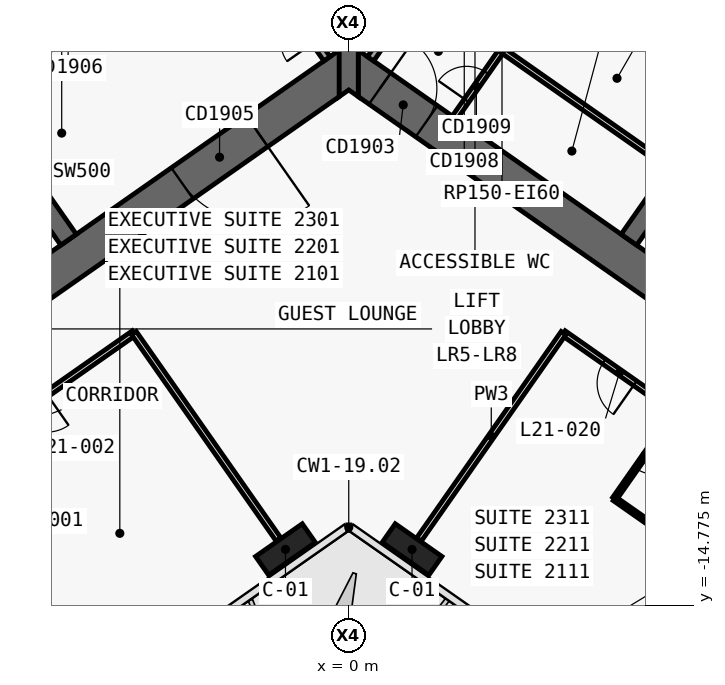
"""IFC4 building model, lengths in metres.
Left out: names, types, materials, properties, quantities, classifications, styles, units other than length and angle.
Written with IfcOpenShell. Run it as: python <this file> out.ifc"""

import sys

from ifc_helpers import new_model, si_unit, direction, frame, frame_2d, origin, origin_2d, place, context, subcontext, project, spatial, polyline, rectangle, outline, extrude, element, fill, save


model = new_model("IFC4")
c1 = context("Model", 3, precision=1e-05, world=origin(), true_north=direction((0.0, 1.0)))
c2 = subcontext(c1, "Body", "Model", "MODEL_VIEW")
j1 = project(units=[si_unit("LENGTHUNIT", "METRE"), si_unit("PLANEANGLEUNIT", "RADIAN")], contexts=[c1])
p1 = place(None, origin())
s1 = spatial("IfcSite", under=j1, at=p1, CompositionType="ELEMENT")
p2 = place(p1, origin())
s2 = spatial("IfcBuilding", under=s1, at=p2, CompositionType="ELEMENT")
p3 = place(p2, frame((0.0, 0.0, 101.3)))
s3 = spatial("IfcBuildingStorey", under=s2, at=p3, CompositionType="ELEMENT", Elevation=101.3)
p4 = place(p3, frame((0.037, 11.867, 0.0), z_axis=(0.0, 0.0, 1.0), x_axis=(-0.819155306259, -0.573571777746, 0.0)))
e1 = element("IfcWall", 1, at=p4, inside=s3, PredefinedType="SHEAR", context=c2, shape_type="SweptSolid", body=[
    extrude(outline(polyline([(33.837, 0.5), (0.7, 0.5), (0.0, -0.5), (33.837, -0.5), (33.837, 0.5)])), origin(), (0.0, 0.0, 1.0), 3.6),
])
p5 = place(p3, frame((0.037, -0.585, 0.0), z_axis=(0.0, 0.0, 1.0), x_axis=(-0.819157152511, -0.573569140985, 0.0)))
e2 = element("IfcWall", 2, at=p5, inside=s3, PredefinedType="SHEAR", context=c2, shape_type="SweptSolid", body=[
    extrude(outline(polyline([(26.695, 0.5), (0.7, 0.5), (0.0, -0.5), (26.695, -0.5), (26.695, 0.5)])), origin(), (0.0, 0.0, 1.0), 3.6),
])
p6 = place(p5, frame((2.995, 0.0, 0.0)))
e3 = element("IfcOpeningElement", 3, at=p6, cuts=e2, PredefinedType="OPENING", context=c2, shape_type="SweptSolid", body=[
    extrude(rectangle(XDim=2.4, YDim=2.1, at=frame_2d((1.2, 1.05))), frame((0.0, 0.51, 0.0), z_axis=(0.0, -1.0, 0.0), x_axis=(1.0, 0.0, 0.0)), (0.0, 0.0, 1.0), 1.02),
])
p7 = place(p5, frame((11.995, 0.0, 0.0)))
e4 = element("IfcOpeningElement", 4, at=p7, cuts=e2, PredefinedType="OPENING", context=c2, shape_type="SweptSolid", body=[
    extrude(rectangle(XDim=2.4, YDim=2.1, at=frame_2d((1.2, 1.05))), frame((0.0, 0.51, 0.0), z_axis=(0.0, -1.0, 0.0), x_axis=(1.0, 0.0, 0.0)), (0.0, 0.0, 1.0), 1.02),
])
p8 = place(p3, frame((-7.372, -5.162, 0.0), z_axis=(0.0, 0.0, 1.0), x_axis=(-0.573594173421, 0.819139624372, 0.0)))
e5 = element("IfcWall", 5, at=p8, inside=s3, PredefinedType="SHEAR", context=c2, shape_type="SweptSolid", body=[
    extrude(outline(polyline([(4.35, 0.25), (0.0, 0.25), (0.0, -0.25), (4.35, -0.25), (4.35, 0.25)])), origin(), (0.0, 0.0, 1.0), 3.6),
])
p9 = place(p3, frame((-2.638, 3.768, 0.0), z_axis=(0.0, 0.0, 1.0), x_axis=(-0.819148977158, -0.573580816643, 0.0)))
e6 = element("IfcWall", 6, at=p9, inside=s3, PredefinedType="SHEAR", context=c2, shape_type="SweptSolid", body=[
    extrude(outline(polyline([(26.0, 0.25), (0.0, 0.25), (0.0, -0.25), (26.0, -0.25), (26.0, 0.25)])), origin(), (0.0, 0.0, 1.0), 3.6),
])
p10 = place(p9, frame((1.169, 0.0, 0.0)))
e7 = element("IfcOpeningElement", 7, at=p10, cuts=e6, PredefinedType="OPENING", context=c2, shape_type="SweptSolid", body=[
    extrude(rectangle(XDim=1.1, YDim=2.1, at=frame_2d((0.55, 1.05))), frame((0.0, 0.26, 0.0), z_axis=(0.0, -1.0, 0.0), x_axis=(1.0, 0.0, 0.0)), (0.0, 0.0, 1.0), 0.52),
])
p11 = place(p9, frame((3.206, 0.0, 0.0)))
e8 = element("IfcOpeningElement", 8, at=p11, cuts=e6, PredefinedType="OPENING", context=c2, shape_type="SweptSolid", body=[
    extrude(rectangle(XDim=1.1, YDim=2.1, at=frame_2d((0.55, 1.05))), frame((0.0, 0.26, 0.0), z_axis=(0.0, -1.0, 0.0), x_axis=(1.0, 0.0, 0.0)), (0.0, 0.0, 1.0), 0.52),
])
p12 = place(p9, frame((5.244, 0.0, 0.0)))
e9 = element("IfcOpeningElement", 9, at=p12, cuts=e6, PredefinedType="OPENING", context=c2, shape_type="SweptSolid", body=[
    extrude(rectangle(XDim=1.1, YDim=2.1, at=frame_2d((0.55, 1.05))), frame((0.0, 0.26, 0.0), z_axis=(0.0, -1.0, 0.0), x_axis=(1.0, 0.0, 0.0)), (0.0, 0.0, 1.0), 0.52),
])
p13 = place(p9, frame((7.281, 0.0, 0.0)))
e10 = element("IfcOpeningElement", 10, at=p13, cuts=e6, PredefinedType="OPENING", context=c2, shape_type="SweptSolid", body=[
    extrude(rectangle(XDim=1.1, YDim=2.1, at=frame_2d((0.55, 1.05))), frame((0.0, 0.26, 0.0), z_axis=(0.0, -1.0, 0.0), x_axis=(1.0, 0.0, 0.0)), (0.0, 0.0, 1.0), 0.52),
])
p14 = place(p9, frame((9.688, 0.0, 0.0)))
e11 = element("IfcOpeningElement", 11, at=p14, cuts=e6, PredefinedType="OPENING", context=c2, shape_type="SweptSolid", body=[
    extrude(rectangle(XDim=1.1, YDim=2.1, at=frame_2d((0.55, 1.05))), frame((0.0, 0.26, 0.0), z_axis=(0.0, -1.0, 0.0), x_axis=(1.0, 0.0, 0.0)), (0.0, 0.0, 1.0), 0.52),
])
p15 = place(p9, frame((11.863, 0.0, 0.0)))
e12 = element("IfcOpeningElement", 12, at=p15, cuts=e6, PredefinedType="OPENING", context=c2, shape_type="SweptSolid", body=[
    extrude(rectangle(XDim=1.1, YDim=2.1, at=frame_2d((0.55, 1.05))), frame((0.0, 0.26, 0.0), z_axis=(0.0, -1.0, 0.0), x_axis=(1.0, 0.0, 0.0)), (0.0, 0.0, 1.0), 0.52),
])
p16 = place(p9, frame((14.038, 0.0, 0.0)))
e13 = element("IfcOpeningElement", 13, at=p16, cuts=e6, PredefinedType="OPENING", context=c2, shape_type="SweptSolid", body=[
    extrude(rectangle(XDim=1.1, YDim=2.1, at=frame_2d((0.55, 1.05))), frame((0.0, 0.26, 0.0), z_axis=(0.0, -1.0, 0.0), x_axis=(1.0, 0.0, 0.0)), (0.0, 0.0, 1.0), 0.52),
])
p17 = place(p9, frame((16.212, 0.0, 0.0)))
e14 = element("IfcOpeningElement", 14, at=p17, cuts=e6, PredefinedType="OPENING", context=c2, shape_type="SweptSolid", body=[
    extrude(rectangle(XDim=1.1, YDim=2.1, at=frame_2d((0.55, 1.05))), frame((0.0, 0.26, 0.0), z_axis=(0.0, -1.0, 0.0), x_axis=(1.0, 0.0, 0.0)), (0.0, 0.0, 1.0), 0.52),
])
p18 = place(p3, frame((-0.037, 11.867, 0.0), z_axis=(0.0, 0.0, 1.0), x_axis=(0.819155306259, -0.573571777746, 0.0)))
e15 = element("IfcWall", 15, at=p18, inside=s3, PredefinedType="SHEAR", context=c2, shape_type="SweptSolid", body=[
    extrude(outline(polyline([(33.837, 0.5), (0.0, 0.5), (0.7, -0.5), (33.837, -0.5), (33.837, 0.5)])), origin(), (0.0, 0.0, 1.0), 3.6),
])
p19 = place(p3, frame((-0.037, -0.585, 0.0), z_axis=(0.0, 0.0, 1.0), x_axis=(0.819157152511, -0.573569140985, 0.0)))
e16 = element("IfcWall", 16, at=p19, inside=s3, PredefinedType="SHEAR", context=c2, shape_type="SweptSolid", body=[
    extrude(outline(polyline([(26.695, 0.5), (0.0, 0.5), (0.7, -0.5), (26.695, -0.5), (26.695, 0.5)])), origin(), (0.0, 0.0, 1.0), 3.6),
])
p20 = place(p19, frame((1.045, 0.0, 0.0)))
e17 = element("IfcOpeningElement", 17, at=p20, cuts=e16, PredefinedType="OPENING", context=c2, shape_type="SweptSolid", body=[
    extrude(rectangle(XDim=1.5, YDim=2.1, at=frame_2d((0.75, 1.05))), frame((0.0, 0.51, 0.0), z_axis=(0.0, -1.0, 0.0), x_axis=(1.0, 0.0, 0.0)), (0.0, 0.0, 1.0), 1.02),
])
p21 = place(p19, frame((12.445, 0.0, 0.0)))
e18 = element("IfcOpeningElement", 18, at=p21, cuts=e16, PredefinedType="OPENING", context=c2, shape_type="SweptSolid", body=[
    extrude(rectangle(XDim=1.5, YDim=2.1, at=frame_2d((0.75, 1.05))), frame((0.0, 0.51, 0.0), z_axis=(0.0, -1.0, 0.0), x_axis=(1.0, 0.0, 0.0)), (0.0, 0.0, 1.0), 1.02),
])
p22 = place(p3, frame((7.372, -5.162, 0.0), z_axis=(0.0, 0.0, 1.0), x_axis=(0.573594173421, 0.819139624372, 0.0)))
e19 = element("IfcWall", 19, at=p22, inside=s3, PredefinedType="SHEAR", context=c2, shape_type="SweptSolid", body=[
    extrude(outline(polyline([(0.0, 0.25), (0.0, -0.25), (4.35, -0.25), (4.35, 0.25), (0.0, 0.25)])), origin(), (0.0, 0.0, 1.0), 3.6),
])
p23 = place(p3, frame((2.638, 3.768, 0.0), z_axis=(0.0, 0.0, 1.0), x_axis=(0.819148977158, -0.573580816643, 0.0)))
e20 = element("IfcWall", 20, at=p23, inside=s3, PredefinedType="SHEAR", context=c2, shape_type="SweptSolid", body=[
    extrude(outline(polyline([(0.0, 0.25), (0.0, -0.25), (26.0, -0.25), (26.0, 0.25), (0.0, 0.25)])), origin(), (0.0, 0.0, 1.0), 3.6),
])
p24 = place(p23, frame((9.637, 0.0, 0.0)))
e21 = element("IfcOpeningElement", 21, at=p24, cuts=e20, PredefinedType="OPENING", context=c2, shape_type="SweptSolid", body=[
    extrude(rectangle(XDim=1.2, YDim=2.1, at=frame_2d((0.6, 1.05))), frame((0.0, 0.26, 0.0), z_axis=(0.0, -1.0, 0.0), x_axis=(1.0, 0.0, 0.0)), (0.0, 0.0, 1.0), 0.52),
])
p25 = place(p23, frame((11.812, 0.0, 0.0)))
e22 = element("IfcOpeningElement", 22, at=p25, cuts=e20, PredefinedType="OPENING", context=c2, shape_type="SweptSolid", body=[
    extrude(rectangle(XDim=1.2, YDim=2.1, at=frame_2d((0.6, 1.05))), frame((0.0, 0.26, 0.0), z_axis=(0.0, -1.0, 0.0), x_axis=(1.0, 0.0, 0.0)), (0.0, 0.0, 1.0), 0.52),
])
p26 = place(p23, frame((13.988, 0.0, 0.0)))
e23 = element("IfcOpeningElement", 23, at=p26, cuts=e20, PredefinedType="OPENING", context=c2, shape_type="SweptSolid", body=[
    extrude(rectangle(XDim=1.2, YDim=2.1, at=frame_2d((0.6, 1.05))), frame((0.0, 0.26, 0.0), z_axis=(0.0, -1.0, 0.0), x_axis=(1.0, 0.0, 0.0)), (0.0, 0.0, 1.0), 0.52),
])
p27 = place(p23, frame((16.262, 0.0, 0.0)))
e24 = element("IfcOpeningElement", 24, at=p27, cuts=e20, PredefinedType="OPENING", context=c2, shape_type="SweptSolid", body=[
    extrude(rectangle(XDim=1.0, YDim=2.1, at=frame_2d((0.5, 1.05))), frame((0.0, 0.26, 0.0), z_axis=(0.0, -1.0, 0.0), x_axis=(1.0, 0.0, 0.0)), (0.0, 0.0, 1.0), 0.52),
])
p28 = place(p3, frame((0.0, -1.396, 0.0), z_axis=(0.0, 0.0, 1.0), x_axis=(0.0, 1.0, 0.0)))
e25 = element("IfcWall", 25, at=p28, inside=s3, PredefinedType="SHEAR", context=c2, shape_type="SweptSolid", body=[
    extrude(outline(polyline([(0.0, -0.25), (0.175, -0.25), (1.221, -0.25), (12.452, -0.25), (13.848, -0.25), (13.857, -0.25), (13.968, -0.172), (13.848, 0.0), (13.968, 0.172), (13.857, 0.25), (13.848, 0.25), (12.452, 0.25), (1.221, 0.25), (0.175, 0.25), (0.0, 0.25), (0.175, 0.0), (0.0, -0.25)])), origin(), (0.0, 0.0, 1.0), 3.6),
])
for number, where, z_axis, x_axis in (
    (26, (-1.665, -13.313, 0.0), (0.0, 0.0, 1.0), (-0.819, -0.574, 0.0)),
    (27, (1.665, -13.313, 0.0), (0.0, 0.0, 1.0), (0.819, -0.574, 0.0)),
):
    element("IfcColumn", number, at=place(p3, frame(where, z_axis=z_axis, x_axis=x_axis)), inside=s3, PredefinedType="COLUMN", context=c2, shape_type="SweptSolid", body=[
        extrude(rectangle(XDim=1.5, YDim=0.6, at=origin_2d()), origin(), (0.0, 0.0, 1.0), 3.6),
    ])
p29 = place(p3, frame((2.785, -1.95, 0.0), z_axis=(0.0, 0.0, 1.0), x_axis=(0.57356780395, 0.819158088694, 0.0)))
e28 = element("IfcWall", 28, at=p29, inside=s3, PredefinedType="PARTITIONING", context=c2, shape_type="SweptSolid", body=[
    extrude(rectangle(XDim=4.35, YDim=0.15, at=frame_2d((2.175, 0.0))), origin(), (0.0, 0.0, 1.0), 3.32),
])
p30 = place(p29, frame((0.55, 0.0, 0.0)))
e29 = element("IfcOpeningElement", 29, at=p30, cuts=e28, PredefinedType="OPENING", context=c2, shape_type="SweptSolid", body=[
    extrude(rectangle(XDim=0.9, YDim=2.1, at=frame_2d((0.45, 1.05))), frame((0.0, 0.085, 0.0), z_axis=(0.0, -1.0, 0.0), x_axis=(1.0, 0.0, 0.0)), (0.0, 0.0, 1.0), 0.17),
])
p31 = place(p29, frame((2.825, 0.0, 0.0)))
e30 = element("IfcOpeningElement", 30, at=p31, cuts=e28, PredefinedType="OPENING", context=c2, shape_type="SweptSolid", body=[
    extrude(rectangle(XDim=0.9, YDim=2.1, at=frame_2d((0.45, 1.05))), frame((0.0, 0.085, 0.0), z_axis=(0.0, -1.0, 0.0), x_axis=(1.0, 0.0, 0.0)), (0.0, 0.0, 1.0), 0.17),
])
p32 = place(p3, frame((4.033, -0.168, 0.0), z_axis=(0.0, 0.0, 1.0), x_axis=(0.819146154531, -0.573584847705, 0.0)))
e31 = element("IfcWall", 31, at=p32, inside=s3, PredefinedType="PARTITIONING", context=c2, shape_type="SweptSolid", body=[
    extrude(rectangle(XDim=5.35, YDim=0.15, at=frame_2d((2.675, 0.0))), origin(), (0.0, 0.0, 1.0), 3.32),
])
p33 = place(p3, frame((-0.573, -0.402, 0.0), z_axis=(0.0, 0.0, 1.0), x_axis=(-0.57356780395, 0.819158088694, 0.0)))
e32 = element("IfcWall", 32, at=p33, inside=s3, PredefinedType="SOLIDWALL", context=c2, shape_type="SweptSolid", body=[
    extrude(rectangle(XDim=4.35, YDim=0.2, at=frame_2d((2.175, 0.0))), origin(), (0.0, 0.0, 1.0), 3.32),
])
p34 = place(p33, frame((0.55, 0.0, 0.0)))
e33 = element("IfcOpeningElement", 33, at=p34, cuts=e32, PredefinedType="OPENING", context=c2, shape_type="SweptSolid", body=[
    extrude(rectangle(XDim=0.9, YDim=2.1, at=frame_2d((0.45, 1.05))), frame((0.0, 0.11, 0.0), z_axis=(0.0, -1.0, 0.0), x_axis=(1.0, 0.0, 0.0)), (0.0, 0.0, 1.0), 0.22),
])
p35 = place(p3, frame((0.573, -0.402, 0.0), z_axis=(0.0, 0.0, 1.0), x_axis=(0.57356780395, 0.819158088694, 0.0)))
e34 = element("IfcWall", 34, at=p35, inside=s3, PredefinedType="SOLIDWALL", context=c2, shape_type="SweptSolid", body=[
    extrude(rectangle(XDim=4.35, YDim=0.2, at=frame_2d((2.175, 0.0))), origin(), (0.0, 0.0, 1.0), 3.32),
])
p36 = place(p35, frame((0.55, 0.0, 0.0)))
e35 = element("IfcOpeningElement", 35, at=p36, cuts=e34, PredefinedType="OPENING", context=c2, shape_type="SweptSolid", body=[
    extrude(rectangle(XDim=0.9, YDim=2.1, at=frame_2d((0.45, 1.05))), frame((0.0, 0.11, 0.0), z_axis=(0.0, -1.0, 0.0), x_axis=(1.0, 0.0, 0.0)), (0.0, 0.0, 1.0), 0.22),
])
p37 = place(p3, frame((8.601, -9.685, 0.0), z_axis=(0.0, 0.0, 1.0), x_axis=(-0.819149096931, 0.573580645591, 0.0)))
e36 = element("IfcWall", 36, at=p37, inside=s3, PredefinedType="PARTITIONING", context=c2, shape_type="SweptSolid", body=[
    extrude(rectangle(XDim=3.601, YDim=0.15, at=frame_2d((1.8, 0.0))), origin(), (0.0, 0.0, 1.0), 2.6),
])
p38 = place(p37, frame((1.301, 0.0, 0.0)))
e37 = element("IfcOpeningElement", 37, at=p38, cuts=e36, PredefinedType="OPENING", context=c2, shape_type="SweptSolid", body=[
    extrude(rectangle(XDim=1.0, YDim=2.1, at=frame_2d((0.5, 1.05))), frame((0.0, 0.085, 0.0), z_axis=(0.0, -1.0, 0.0), x_axis=(1.0, 0.0, 0.0)), (0.0, 0.0, 1.0), 0.17),
])
p39 = place(p3, frame((-5.652, -7.62, 0.0), z_axis=(0.0, 0.0, 1.0), x_axis=(-0.819155459934, -0.573571558274, 0.0)))
e38 = element("IfcWall", 38, at=p39, inside=s3, PredefinedType="PARTITIONING", context=c2, shape_type="SweptSolid", body=[
    extrude(rectangle(XDim=6.601, YDim=0.15, at=frame_2d((3.301, 0.0))), origin(), (0.0, 0.0, 1.0), 2.6),
])
p40 = place(p39, frame((2.8, 0.0, 0.0)))
e39 = element("IfcOpeningElement", 39, at=p40, cuts=e38, PredefinedType="OPENING", context=c2, shape_type="SweptSolid", body=[
    extrude(rectangle(XDim=1.0, YDim=2.1, at=frame_2d((0.5, 1.05))), frame((0.0, 0.085, 0.0), z_axis=(0.0, -1.0, 0.0), x_axis=(1.0, 0.0, 0.0)), (0.0, 0.0, 1.0), 0.17),
])
p41 = place(p3, frame((8.6, -9.684, 0.0), z_axis=(0.0, 0.0, 1.0), x_axis=(-0.573550118428, -0.819170471667, 0.0)))
e40 = element("IfcWall", 40, at=p41, inside=s3, PredefinedType="PARTITIONING", context=c2, shape_type="SweptSolid", body=[
    extrude(rectangle(XDim=2.8, YDim=0.12, at=frame_2d((1.4, 0.0))), origin(), (0.0, 0.0, 1.0), 3.32),
])
p42 = place(p41, frame((0.975, 0.0, 0.0)))
e41 = element("IfcOpeningElement", 41, at=p42, cuts=e40, PredefinedType="OPENING", context=c2, shape_type="SweptSolid", body=[
    extrude(rectangle(XDim=0.85, YDim=2.05, at=frame_2d((0.425, 1.025))), frame((0.0, 0.07, 0.0), z_axis=(0.0, -1.0, 0.0), x_axis=(1.0, 0.0, 0.0)), (0.0, 0.0, 1.0), 0.14),
])
p43 = place(p3, frame((6.994, -11.979, 0.0), z_axis=(0.0, 0.0, 1.0), x_axis=(0.819188907105, -0.573523787192, 0.0)))
e42 = element("IfcWall", 42, at=p43, inside=s3, PredefinedType="PARTITIONING", context=c2, shape_type="SweptSolid", body=[
    extrude(rectangle(XDim=2.4, YDim=0.12, at=frame_2d((1.2, 0.0))), origin(), (0.0, 0.0, 1.0), 3.32),
])
p44 = place(p3, frame((8.96, -13.355, 0.0), z_axis=(0.0, 0.0, 1.0), x_axis=(-0.573564311442, -0.819160534108, 0.0)))
e43 = element("IfcWall", 43, at=p44, inside=s3, PredefinedType="PARTITIONING", context=c2, shape_type="SweptSolid", body=[
    extrude(rectangle(XDim=4.499, YDim=0.15, at=frame_2d((2.25, 0.0))), origin(), (0.0, 0.0, 1.0), 2.5),
])
p45 = place(p3, frame((1.849, -13.051, 0.0), z_axis=(0.0, 0.0, 1.0), x_axis=(0.57357355307, 0.819154063177, 0.0)))
e44 = element("IfcWall", 44, at=p45, inside=s3, PredefinedType="PARTITIONING", context=c2, shape_type="SweptSolid", body=[
    extrude(rectangle(XDim=6.63, YDim=0.15, at=frame_2d((3.315, 0.0))), origin(), (0.0, 0.0, 1.0), 2.6),
])
p46 = place(p3, frame((-1.849, -13.051, 0.0), z_axis=(0.0, 0.0, 1.0), x_axis=(-0.573575988258, 0.819152358047, 0.0)))
e45 = element("IfcWall", 45, at=p46, inside=s3, PredefinedType="PARTITIONING", context=c2, shape_type="SweptSolid", body=[
    extrude(rectangle(XDim=6.632, YDim=0.15, at=frame_2d((3.316, 0.0))), origin(), (0.0, 0.0, 1.0), 2.6),
])
p47 = place(p6, origin())
e46 = element("IfcDoor", 46, at=p47, inside=s3, OperationType="DOUBLE_DOOR_SINGLE_SWING", PredefinedType="DOOR", context=c2, shape_type="SweptSolid", body=[
    extrude(rectangle(XDim=2.4, YDim=2.1, at=frame_2d((1.2, 1.05))), frame((0.0, 0.025, 0.0), z_axis=(0.0, -1.0, 0.0), x_axis=(1.0, 0.0, 0.0)), (0.0, 0.0, 1.0), 0.05),
])
fill(e3, e46)
p48 = place(p30, origin())
e47 = element("IfcDoor", 47, at=p48, inside=s3, OperationType="SINGLE_SWING_RIGHT", PredefinedType="DOOR", context=c2, shape_type="SweptSolid", body=[
    extrude(rectangle(XDim=0.9, YDim=2.1, at=frame_2d((0.45, 1.05))), frame((0.0, 0.025, 0.0), z_axis=(0.0, -1.0, 0.0), x_axis=(1.0, 0.0, 0.0)), (0.0, 0.0, 1.0), 0.05),
])
fill(e29, e47)
p49 = place(p20, origin())
e48 = element("IfcDoor", 48, at=p49, inside=s3, OperationType="SINGLE_SWING_RIGHT", PredefinedType="DOOR", context=c2, shape_type="SweptSolid", body=[
    extrude(rectangle(XDim=1.5, YDim=2.1, at=frame_2d((0.75, 1.05))), frame((0.0, 0.025, 0.0), z_axis=(0.0, -1.0, 0.0), x_axis=(1.0, 0.0, 0.0)), (0.0, 0.0, 1.0), 0.05),
])
fill(e17, e48)
p50 = place(p42, origin())
e49 = element("IfcDoor", 49, at=p50, inside=s3, OperationType="SINGLE_SWING_LEFT", PredefinedType="DOOR", context=c2, shape_type="SweptSolid", body=[
    extrude(rectangle(XDim=0.85, YDim=2.05, at=frame_2d((0.425, 1.025))), frame((0.0, 0.025, 0.0), z_axis=(0.0, -1.0, 0.0), x_axis=(1.0, 0.0, 0.0)), (0.0, 0.0, 1.0), 0.05),
])
fill(e41, e49)
p51 = place(p38, origin())
e50 = element("IfcDoor", 50, at=p51, inside=s3, OperationType="SINGLE_SWING_RIGHT", PredefinedType="DOOR", context=c2, shape_type="SweptSolid", body=[
    extrude(rectangle(XDim=1.0, YDim=2.1, at=frame_2d((0.5, 1.05))), frame((0.0, 0.025, 0.0), z_axis=(0.0, -1.0, 0.0), x_axis=(1.0, 0.0, 0.0)), (0.0, 0.0, 1.0), 0.05),
])
fill(e37, e50)
save(model, sys.argv[1])
